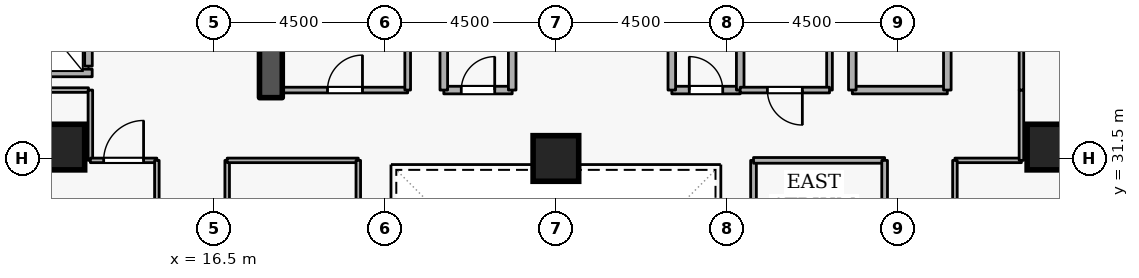
"""IFC4 building model, lengths in metres.
Left out: names, types, materials, properties, quantities, classifications, styles, units other than length and angle.
Written with IfcOpenShell. Run it as: python <this file> out.ifc"""

import sys

from ifc_helpers import new_model, si_unit, direction, frame, frame_2d, origin, origin_2d, place, context, subcontext, project, spatial, rectangle, extrude, element, fill, save


model = new_model("IFC4")
c1 = context("Model", 3, precision=1e-05, world=origin(), true_north=direction((0.0, 1.0)))
c2 = subcontext(c1, "Body", "Model", "MODEL_VIEW")
j1 = project(units=[si_unit("LENGTHUNIT", "METRE"), si_unit("PLANEANGLEUNIT", "RADIAN")], contexts=[c1])
p1 = place(None, origin())
s1 = spatial("IfcSite", under=j1, at=p1, CompositionType="ELEMENT")
p2 = place(p1, origin())
s2 = spatial("IfcBuilding", under=s1, at=p2, CompositionType="ELEMENT")
p3 = place(p2, frame((0.0, 0.0, 116.1)))
s3 = spatial("IfcBuildingStorey", under=s2, at=p3, CompositionType="ELEMENT", Elevation=116.1)
p4 = place(p3, frame((18.0, 33.1, 0.0), z_axis=(0.0, 0.0, 1.0), x_axis=(0.0, 1.0, 0.0)))
e1 = element("IfcWall", 1, at=p4, inside=s3, PredefinedType="SHEAR", context=c2, shape_type="SweptSolid", body=[
    extrude(rectangle(XDim=5.7, YDim=0.6, at=frame_2d((2.85, 0.0))), origin(), (0.0, 0.0, 1.0), 3.6),
])
for number, where, z_axis, x_axis in (
    (2, (12.5, 31.8, 0.0), (0.0, 0.0, 1.0), (1.0, 0.0, 0.0)),
    (3, (38.5, 31.8, 0.0), (0.0, 0.0, 1.0), (1.0, 0.0, 0.0)),
    (4, (25.5, 31.5, 0.0), (0.0, 0.0, 1.0), (1.0, 0.0, 0.0)),
):
    element("IfcColumn", number, at=place(p3, frame(where, z_axis=z_axis, x_axis=x_axis)), inside=s3, PredefinedType="COLUMN", context=c2, shape_type="SweptSolid", body=[
        extrude(rectangle(XDim=1.2, YDim=1.2, at=origin_2d()), origin(), (0.0, 0.0, 1.0), 3.6),
    ])
p5 = place(p3, frame((13.2, 33.93, 0.0), z_axis=(0.0, 0.0, 1.0), x_axis=(0.0, 1.0, 0.0)))
e5 = element("IfcWall", 5, at=p5, inside=s3, PredefinedType="STANDARD", context=c2, shape_type="SweptSolid", body=[
    extrude(rectangle(XDim=1.94, YDim=0.2, at=frame_2d((0.97, 0.0))), origin(), (0.0, 0.0, 1.0), 3.32),
])
p6 = place(p5, frame((0.46, 0.0, 0.0)))
e6 = element("IfcOpeningElement", 6, at=p6, cuts=e5, PredefinedType="OPENING", context=c2, shape_type="SweptSolid", body=[
    extrude(rectangle(XDim=1.02, YDim=2.06, at=frame_2d((0.51, 1.03))), frame((0.0, 0.11, 0.0), z_axis=(0.0, -1.0, 0.0), x_axis=(1.0, 0.0, 0.0)), (0.0, 0.0, 1.0), 0.22),
])
p7 = place(p3, frame((11.002, 33.75, 0.0), z_axis=(0.0, 0.0, 1.0), x_axis=(1.0, 0.0, 0.0)))
e7 = element("IfcWall", 7, at=p7, inside=s3, PredefinedType="STANDARD", context=c2, shape_type="SweptSolid", body=[
    extrude(rectangle(XDim=2.296, YDim=0.2, at=frame_2d((1.148, 0.0))), origin(), (0.0, 0.0, 1.0), 3.32),
])
p8 = place(p3, frame((33.3, 33.3, 0.0), z_axis=(0.0, 0.0, 1.0), x_axis=(1.0, 0.0, 0.0)))
e8 = element("IfcWall", 8, at=p8, inside=s3, PredefinedType="STANDARD", context=c2, shape_type="SweptSolid", body=[
    extrude(rectangle(XDim=2.5, YDim=0.2, at=frame_2d((1.25, 0.0))), origin(), (0.0, 0.0, 1.0), 3.32),
])
p9 = place(p3, frame((35.8, 33.3, 0.0), z_axis=(0.0, 0.0, 1.0), x_axis=(0.0, 1.0, 0.0)))
e9 = element("IfcWall", 9, at=p9, inside=s3, PredefinedType="STANDARD", context=c2, shape_type="SweptSolid", body=[
    extrude(rectangle(XDim=5.7, YDim=0.2, at=frame_2d((2.85, 0.0))), origin(), (0.0, 0.0, 1.0), 3.32),
])
p10 = place(p9, frame((2.275, 0.0, 0.0)))
e10 = element("IfcOpeningElement", 10, at=p10, cuts=e9, PredefinedType="OPENING", context=c2, shape_type="SweptSolid", body=[
    extrude(rectangle(XDim=1.15, YDim=2.1, at=frame_2d((0.575, 1.05))), frame((0.0, 0.11, 0.0), z_axis=(0.0, -1.0, 0.0), x_axis=(1.0, 0.0, 0.0)), (0.0, 0.0, 1.0), 0.22),
])
p11 = place(p3, frame((33.3, 35.6, 0.0), z_axis=(0.0, 0.0, 1.0), x_axis=(0.0, -1.0, 0.0)))
e11 = element("IfcWall", 11, at=p11, inside=s3, PredefinedType="STANDARD", context=c2, shape_type="SweptSolid", body=[
    extrude(rectangle(XDim=2.3, YDim=0.2, at=frame_2d((1.15, 0.0))), origin(), (0.0, 0.0, 1.0), 2.525),
])
p12 = place(p3, frame((22.55, 33.3, 0.0), z_axis=(0.0, 0.0, 1.0), x_axis=(1.0, 0.0, 0.0)))
e12 = element("IfcWall", 12, at=p12, inside=s3, PredefinedType="STANDARD", context=c2, shape_type="SweptSolid", body=[
    extrude(rectangle(XDim=1.8, YDim=0.2, at=frame_2d((0.9, 0.0))), origin(), (0.0, 0.0, 1.0), 3.32),
])
p13 = place(p12, frame((0.46, 0.0, 0.0)))
e13 = element("IfcOpeningElement", 13, at=p13, cuts=e12, PredefinedType="OPENING", context=c2, shape_type="SweptSolid", body=[
    extrude(rectangle(XDim=0.88, YDim=2.04, at=frame_2d((0.44, 1.02))), frame((0.0, 0.11, 0.0), z_axis=(0.0, -1.0, 0.0), x_axis=(1.0, 0.0, 0.0)), (0.0, 0.0, 1.0), 0.22),
])
for number, where, z_axis, x_axis in (
    (14, (24.35, 33.3, 0.0), (0.0, 0.0, 1.0), (0.0, 1.0, 0.0)),
    (15, (22.55, 35.35, 0.0), (0.0, 0.0, 1.0), (0.0, -1.0, 0.0)),
):
    element("IfcWall", number, at=place(p3, frame(where, z_axis=z_axis, x_axis=x_axis)), inside=s3, PredefinedType="STANDARD", context=c2, shape_type="SweptSolid", body=[
        extrude(rectangle(XDim=2.05, YDim=0.2, at=frame_2d((1.025, 0.0))), origin(), (0.0, 0.0, 1.0), 3.32),
    ])
p14 = place(p3, frame((28.55, 33.3, 0.0), z_axis=(0.0, 0.0, 1.0), x_axis=(1.0, 0.0, 0.0)))
e16 = element("IfcWall", 16, at=p14, inside=s3, PredefinedType="STANDARD", context=c2, shape_type="SweptSolid", body=[
    extrude(rectangle(XDim=1.8, YDim=0.2, at=frame_2d((0.9, 0.0))), origin(), (0.0, 0.0, 1.0), 3.32),
])
p15 = place(p14, frame((0.46, 0.0, 0.0)))
e17 = element("IfcOpeningElement", 17, at=p15, cuts=e16, PredefinedType="OPENING", context=c2, shape_type="SweptSolid", body=[
    extrude(rectangle(XDim=0.88, YDim=2.04, at=frame_2d((0.44, 1.02))), frame((0.0, 0.11, 0.0), z_axis=(0.0, -1.0, 0.0), x_axis=(1.0, 0.0, 0.0)), (0.0, 0.0, 1.0), 0.22),
])
for number, where, z_axis, x_axis in (
    (18, (30.35, 33.3, 0.0), (0.0, 0.0, 1.0), (0.0, 1.0, 0.0)),
    (19, (28.55, 35.35, 0.0), (0.0, 0.0, 1.0), (0.0, -1.0, 0.0)),
):
    element("IfcWall", number, at=place(p3, frame(where, z_axis=z_axis, x_axis=x_axis)), inside=s3, PredefinedType="STANDARD", context=c2, shape_type="SweptSolid", body=[
        extrude(rectangle(XDim=2.05, YDim=0.2, at=frame_2d((1.025, 0.0))), origin(), (0.0, 0.0, 1.0), 3.32),
    ])
p16 = place(p3, frame((18.3, 33.3, 0.0), z_axis=(0.0, 0.0, 1.0), x_axis=(1.0, 0.0, 0.0)))
e20 = element("IfcWall", 20, at=p16, inside=s3, PredefinedType="PARTITIONING", context=c2, shape_type="SweptSolid", body=[
    extrude(rectangle(XDim=3.3, YDim=0.15, at=frame_2d((1.65, 0.0))), origin(), (0.0, 0.0, 1.0), 3.32),
])
p17 = place(p16, frame((1.19, 0.0, 0.0)))
e21 = element("IfcOpeningElement", 21, at=p17, cuts=e20, PredefinedType="OPENING", context=c2, shape_type="SweptSolid", body=[
    extrude(rectangle(XDim=0.92, YDim=2.08, at=frame_2d((0.46, 1.04))), frame((0.0, 0.085, 0.0), z_axis=(0.0, -1.0, 0.0), x_axis=(1.0, 0.0, 0.0)), (0.0, 0.0, 1.0), 0.17),
])
p18 = place(p3, frame((21.6, 33.3, 0.0), z_axis=(0.0, 0.0, 1.0), x_axis=(0.0, 1.0, 0.0)))
e22 = element("IfcWall", 22, at=p18, inside=s3, PredefinedType="PARTITIONING", context=c2, shape_type="SweptSolid", body=[
    extrude(rectangle(XDim=2.05, YDim=0.15, at=frame_2d((1.025, 0.0))), origin(), (0.0, 0.0, 1.0), 3.32),
])
p19 = place(p3, frame((32.7, 35.35, 0.0), z_axis=(0.0, 0.0, 1.0), x_axis=(0.0, -1.0, 0.0)))
e23 = element("IfcWall", 23, at=p19, inside=s3, PredefinedType="PARTITIONING", context=c2, shape_type="SweptSolid", body=[
    extrude(rectangle(XDim=2.05, YDim=0.15, at=frame_2d((1.025, 0.0))), origin(), (0.0, 0.0, 1.0), 2.525),
])
p20 = place(p3, frame((32.7, 33.3, 0.0), z_axis=(0.0, 0.0, 1.0), x_axis=(-1.0, 0.0, 0.0)))
e24 = element("IfcWall", 24, at=p20, inside=s3, PredefinedType="PARTITIONING", context=c2, shape_type="SweptSolid", body=[
    extrude(rectangle(XDim=2.35, YDim=0.15, at=frame_2d((1.175, 0.0))), origin(), (0.0, 0.0, 1.0), 3.32),
])
p21 = place(p20, frame((0.715, 0.0, 0.0)))
e25 = element("IfcOpeningElement", 25, at=p21, cuts=e24, PredefinedType="OPENING", context=c2, shape_type="SweptSolid", body=[
    extrude(rectangle(XDim=0.92, YDim=2.08, at=frame_2d((0.46, 1.04))), frame((0.0, 0.085, 0.0), z_axis=(0.0, -1.0, 0.0), x_axis=(1.0, 0.0, 0.0)), (0.0, 0.0, 1.0), 0.17),
])
p22 = place(p3, frame((10.9, 33.3, 0.0), z_axis=(0.0, 0.0, 1.0), x_axis=(1.0, 0.0, 0.0)))
e26 = element("IfcWall", 26, at=p22, inside=s3, PredefinedType="PARTITIONING", context=c2, shape_type="SweptSolid", body=[
    extrude(rectangle(XDim=2.3, YDim=0.12, at=frame_2d((1.15, 0.0))), origin(), (0.0, 0.0, 1.0), 3.32),
])
p23 = place(p3, frame((13.25, 33.3, 0.0), z_axis=(0.0, 0.0, 1.0), x_axis=(0.0, -1.0, 0.0)))
e27 = element("IfcWall", 27, at=p23, inside=s3, PredefinedType="PARTITIONING", context=c2, shape_type="SweptSolid", body=[
    extrude(rectangle(XDim=1.85, YDim=0.12, at=frame_2d((0.925, 0.0))), origin(), (0.0, 0.0, 1.0), 3.32),
])
p24 = place(p3, frame((13.25, 31.45, 0.0), z_axis=(0.0, 0.0, 1.0), x_axis=(1.0, 0.0, 0.0)))
e28 = element("IfcWall", 28, at=p24, inside=s3, PredefinedType="PARTITIONING", context=c2, shape_type="SweptSolid", body=[
    extrude(rectangle(XDim=1.75, YDim=0.12, at=frame_2d((0.875, 0.0))), origin(), (0.0, 0.0, 1.0), 3.32),
])
p25 = place(p24, frame((0.35, 0.0, 0.0)))
e29 = element("IfcOpeningElement", 29, at=p25, cuts=e28, PredefinedType="OPENING", context=c2, shape_type="SweptSolid", body=[
    extrude(rectangle(XDim=1.05, YDim=2.1, at=frame_2d((0.525, 1.05))), frame((0.0, 0.07, 0.0), z_axis=(0.0, -1.0, 0.0), x_axis=(1.0, 0.0, 0.0)), (0.0, 0.0, 1.0), 0.14),
])
p26 = place(p3, frame((15.0, 31.45, 0.0), z_axis=(0.0, 0.0, 1.0), x_axis=(0.0, -1.0, 0.0)))
e30 = element("IfcWall", 30, at=p26, inside=s3, PredefinedType="PARTITIONING", context=c2, shape_type="SweptSolid", body=[
    extrude(rectangle(XDim=1.3, YDim=0.12, at=frame_2d((0.65, 0.0))), origin(), (0.0, 0.0, 1.0), 3.32),
])
p27 = place(p3, frame((36.0, 31.45, 0.0), z_axis=(0.0, 0.0, 1.0), x_axis=(1.0, 0.0, 0.0)))
e31 = element("IfcWall", 31, at=p27, inside=s3, PredefinedType="PARTITIONING", context=c2, shape_type="SweptSolid", body=[
    extrude(rectangle(XDim=1.75, YDim=0.12, at=frame_2d((0.875, 0.0))), origin(), (0.0, 0.0, 1.0), 3.32),
])
p28 = place(p3, frame((37.75, 31.45, 0.0), z_axis=(0.0, 0.0, 1.0), x_axis=(0.0, 1.0, 0.0)))
e32 = element("IfcWall", 32, at=p28, inside=s3, PredefinedType="PARTITIONING", context=c2, shape_type="SweptSolid", body=[
    extrude(rectangle(XDim=1.85, YDim=0.12, at=frame_2d((0.925, 0.0))), origin(), (0.0, 0.0, 1.0), 3.32),
])
p29 = place(p3, frame((37.75, 33.3, 0.0), z_axis=(0.0, 0.0, 1.0), x_axis=(0.0, 1.0, 0.0)))
e33 = element("IfcWall", 33, at=p29, inside=s3, PredefinedType="PARTITIONING", context=c2, shape_type="SweptSolid", body=[
    extrude(rectangle(XDim=9.35, YDim=0.12, at=frame_2d((4.675, 0.0))), origin(), (0.0, 0.0, 1.0), 3.32),
])
p30 = place(p29, frame((4.2, 0.0, 0.0)))
e34 = element("IfcOpeningElement", 34, at=p30, cuts=e33, PredefinedType="OPENING", context=c2, shape_type="SweptSolid", body=[
    extrude(rectangle(XDim=0.95, YDim=2.1, at=frame_2d((0.475, 1.05))), frame((0.0, 0.07, 0.0), z_axis=(0.0, -1.0, 0.0), x_axis=(1.0, 0.0, 0.0)), (0.0, 0.0, 1.0), 0.14),
])
p31 = place(p3, frame((36.0, 30.15, 0.0), z_axis=(0.0, 0.0, 1.0), x_axis=(0.0, 1.0, 0.0)))
e35 = element("IfcWall", 35, at=p31, inside=s3, PredefinedType="PARTITIONING", context=c2, shape_type="SweptSolid", body=[
    extrude(rectangle(XDim=1.3, YDim=0.12, at=frame_2d((0.65, 0.0))), origin(), (0.0, 0.0, 1.0), 3.32),
])
p32 = place(p3, frame((30.7, 22.55, 0.0), z_axis=(0.0, 0.0, 1.0), x_axis=(0.0, 1.0, 0.0)))
e36 = element("IfcWall", 36, at=p32, inside=s3, PredefinedType="PARTITIONING", context=c2, shape_type="SweptSolid", body=[
    extrude(rectangle(XDim=8.9, YDim=0.15, at=frame_2d((4.45, 0.0))), origin(), (0.0, 0.0, 1.0), 3.32),
])
p33 = place(p3, frame((30.7, 31.45, 0.0), z_axis=(0.0, 0.0, 1.0), x_axis=(1.0, 0.0, 0.0)))
e37 = element("IfcWall", 37, at=p33, inside=s3, PredefinedType="PARTITIONING", context=c2, shape_type="SweptSolid", body=[
    extrude(rectangle(XDim=3.45, YDim=0.15, at=frame_2d((1.725, 0.0))), origin(), (0.0, 0.0, 1.0), 3.32),
])
p34 = place(p3, frame((34.15, 31.45, 0.0), z_axis=(0.0, 0.0, 1.0), x_axis=(0.0, -1.0, 0.0)))
e38 = element("IfcWall", 38, at=p34, inside=s3, PredefinedType="PARTITIONING", context=c2, shape_type="SweptSolid", body=[
    extrude(rectangle(XDim=8.9, YDim=0.15, at=frame_2d((4.45, 0.0))), origin(), (0.0, 0.0, 1.0), 3.32),
])
p35 = place(p34, frame((3.8, 0.0, 0.0)))
e39 = element("IfcOpeningElement", 39, at=p35, cuts=e38, PredefinedType="OPENING", context=c2, shape_type="SweptSolid", body=[
    extrude(rectangle(XDim=1.3, YDim=2.12, at=frame_2d((0.65, 1.06))), frame((0.0, 0.085, 0.0), z_axis=(0.0, -1.0, 0.0), x_axis=(1.0, 0.0, 0.0)), (0.0, 0.0, 1.0), 0.17),
])
p36 = place(p3, frame((16.85, 22.55, 0.0), z_axis=(0.0, 0.0, 1.0), x_axis=(0.0, 1.0, 0.0)))
e40 = element("IfcWall", 40, at=p36, inside=s3, PredefinedType="PARTITIONING", context=c2, shape_type="SweptSolid", body=[
    extrude(rectangle(XDim=8.9, YDim=0.12, at=frame_2d((4.45, 0.0))), origin(), (0.0, 0.0, 1.0), 3.32),
])
p37 = place(p36, frame((2.875, 0.0, 0.0)))
e41 = element("IfcOpeningElement", 41, at=p37, cuts=e40, PredefinedType="OPENING", context=c2, shape_type="SweptSolid", body=[
    extrude(rectangle(XDim=0.95, YDim=2.1, at=frame_2d((0.475, 1.05))), frame((0.0, 0.07, 0.0), z_axis=(0.0, -1.0, 0.0), x_axis=(1.0, 0.0, 0.0)), (0.0, 0.0, 1.0), 0.14),
])
p38 = place(p3, frame((16.85, 31.45, 0.0), z_axis=(0.0, 0.0, 1.0), x_axis=(1.0, 0.0, 0.0)))
e42 = element("IfcWall", 42, at=p38, inside=s3, PredefinedType="PARTITIONING", context=c2, shape_type="SweptSolid", body=[
    extrude(rectangle(XDim=3.45, YDim=0.12, at=frame_2d((1.725, 0.0))), origin(), (0.0, 0.0, 1.0), 3.32),
])
p39 = place(p3, frame((20.3, 31.45, 0.0), z_axis=(0.0, 0.0, 1.0), x_axis=(0.0, -1.0, 0.0)))
e43 = element("IfcWall", 43, at=p39, inside=s3, PredefinedType="PARTITIONING", context=c2, shape_type="SweptSolid", body=[
    extrude(rectangle(XDim=8.9, YDim=0.12, at=frame_2d((4.45, 0.0))), origin(), (0.0, 0.0, 1.0), 3.32),
])
p40 = place(p13, origin())
e44 = element("IfcDoor", 44, at=p40, inside=s3, OperationType="SINGLE_SWING_RIGHT", PredefinedType="DOOR", context=c2, shape_type="SweptSolid", body=[
    extrude(rectangle(XDim=0.88, YDim=2.04, at=frame_2d((0.44, 1.02))), frame((0.0, 0.025, 0.0), z_axis=(0.0, -1.0, 0.0), x_axis=(1.0, 0.0, 0.0)), (0.0, 0.0, 1.0), 0.05),
])
fill(e13, e44)
p41 = place(p15, origin())
e45 = element("IfcDoor", 45, at=p41, inside=s3, OperationType="SINGLE_SWING_LEFT", PredefinedType="DOOR", context=c2, shape_type="SweptSolid", body=[
    extrude(rectangle(XDim=0.88, YDim=2.04, at=frame_2d((0.44, 1.02))), frame((0.0, 0.025, 0.0), z_axis=(0.0, -1.0, 0.0), x_axis=(1.0, 0.0, 0.0)), (0.0, 0.0, 1.0), 0.05),
])
fill(e17, e45)
p42 = place(p17, origin())
e46 = element("IfcDoor", 46, at=p42, inside=s3, OperationType="SINGLE_SWING_RIGHT", PredefinedType="DOOR", context=c2, shape_type="SweptSolid", body=[
    extrude(rectangle(XDim=0.92, YDim=2.08, at=frame_2d((0.46, 1.04))), frame((0.0, 0.025, 0.0), z_axis=(0.0, -1.0, 0.0), x_axis=(1.0, 0.0, 0.0)), (0.0, 0.0, 1.0), 0.05),
])
fill(e21, e46)
p43 = place(p21, origin())
e47 = element("IfcDoor", 47, at=p43, inside=s3, OperationType="SINGLE_SWING_LEFT", PredefinedType="DOOR", context=c2, shape_type="SweptSolid", body=[
    extrude(rectangle(XDim=0.92, YDim=2.08, at=frame_2d((0.46, 1.04))), frame((0.0, 0.025, 0.0), z_axis=(0.0, -1.0, 0.0), x_axis=(1.0, 0.0, 0.0)), (0.0, 0.0, 1.0), 0.05),
])
fill(e25, e47)
p44 = place(p25, origin())
e48 = element("IfcDoor", 48, at=p44, inside=s3, OperationType="SINGLE_SWING_RIGHT", PredefinedType="DOOR", context=c2, shape_type="SweptSolid", body=[
    extrude(rectangle(XDim=1.05, YDim=2.1, at=frame_2d((0.525, 1.05))), frame((0.0, 0.025, 0.0), z_axis=(0.0, -1.0, 0.0), x_axis=(1.0, 0.0, 0.0)), (0.0, 0.0, 1.0), 0.05),
])
fill(e29, e48)
save(model, sys.argv[1])
